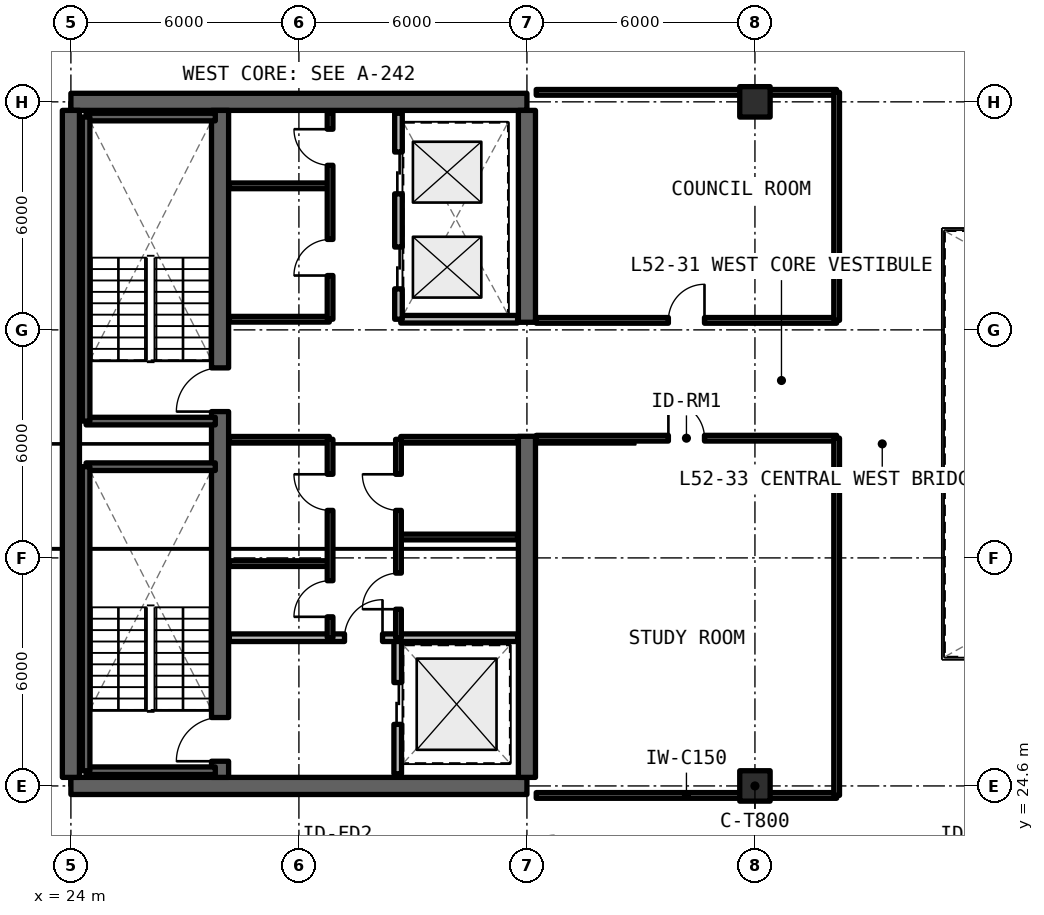
"""IFC4 building model, lengths in metres.
Left out: names, types, materials, properties, quantities, classifications, styles, units other than length and angle.
Written with IfcOpenShell. Run it as: python <this file> out.ifc"""

import sys

from ifc_helpers import new_model, si_unit, direction, frame, frame_2d, origin, origin_2d, place, context, subcontext, project, spatial, rectangle, extrude, element, fill, save


model = new_model("IFC4")
c1 = context("Model", 3, precision=1e-05, world=origin(), true_north=direction((0.0, 1.0)))
c2 = subcontext(c1, "Body", "Model", "MODEL_VIEW")
j1 = project(units=[si_unit("LENGTHUNIT", "METRE"), si_unit("PLANEANGLEUNIT", "RADIAN")], contexts=[c1])
p1 = place(None, origin())
s1 = spatial("IfcSite", under=j1, at=p1, CompositionType="ELEMENT")
p2 = place(p1, origin())
s2 = spatial("IfcBuilding", under=s1, at=p2, CompositionType="ELEMENT")
p3 = place(p2, frame((0.0, 0.0, 188.43)))
s3 = spatial("IfcBuildingStorey", under=s2, at=p3, CompositionType="ELEMENT", Elevation=188.43)
for number, where, z_axis, x_axis in (
    (1, (24.0, 24.6, 0.0), (0.0, 0.0, 1.0), (1.0, 0.0, 0.0)),
    (2, (36.0, 42.6, 0.0), (0.0, 0.0, 1.0), (-1.0, 0.0, 0.0)),
):
    element("IfcWall", number, at=place(p3, frame(where, z_axis=z_axis, x_axis=x_axis)), inside=s3, PredefinedType="SHEAR", context=c2, shape_type="SweptSolid", body=[
        extrude(rectangle(XDim=12.0, YDim=0.45, at=frame_2d((6.0, 0.0))), origin(), (0.0, 0.0, 1.0), 3.3),
    ])
p4 = place(p3, frame((24.0, 24.825, 0.0), z_axis=(0.0, 0.0, 1.0), x_axis=(0.0, 1.0, 0.0)))
e3 = element("IfcWall", 3, at=p4, inside=s3, PredefinedType="SHEAR", context=c2, shape_type="SweptSolid", body=[
    extrude(rectangle(XDim=17.55, YDim=0.45, at=frame_2d((8.775, 0.0))), origin(), (0.0, 0.0, 1.0), 3.3),
])
p5 = place(p3, frame((36.0, 24.825, 0.0), z_axis=(0.0, 0.0, 1.0), x_axis=(0.0, 1.0, 0.0)))
e4 = element("IfcWall", 4, at=p5, inside=s3, PredefinedType="SHEAR", context=c2, shape_type="SweptSolid", body=[
    extrude(rectangle(XDim=8.975, YDim=0.45, at=frame_2d((4.488, 0.0))), origin(), (0.0, 0.0, 1.0), 3.3),
])
p6 = place(p3, frame((36.0, 36.8, 0.0), z_axis=(0.0, 0.0, 1.0), x_axis=(0.0, 1.0, 0.0)))
e5 = element("IfcWall", 5, at=p6, inside=s3, PredefinedType="SHEAR", context=c2, shape_type="SweptSolid", body=[
    extrude(rectangle(XDim=5.575, YDim=0.45, at=frame_2d((2.788, 0.0))), origin(), (0.0, 0.0, 1.0), 3.3),
])
p7 = place(p3, frame((27.925, 24.825, 0.0), z_axis=(0.0, 0.0, 1.0), x_axis=(0.0, 1.0, 0.0)))
e6 = element("IfcWall", 6, at=p7, inside=s3, PredefinedType="SHEAR", context=c2, shape_type="SweptSolid", body=[
    extrude(rectangle(XDim=17.55, YDim=0.45, at=frame_2d((8.775, 0.0))), origin(), (0.0, 0.0, 1.0), 3.3),
])
p8 = place(p7, frame((0.425, 0.0, 0.0)))
e7 = element("IfcOpeningElement", 7, at=p8, cuts=e6, PredefinedType="OPENING", context=c2, shape_type="SweptSolid", body=[
    extrude(rectangle(XDim=1.15, YDim=2.15, at=frame_2d((0.575, 1.075))), frame((0.0, 0.235, 0.0), z_axis=(0.0, -1.0, 0.0), x_axis=(1.0, 0.0, 0.0)), (0.0, 0.0, 1.0), 0.47),
])
p9 = place(p7, frame((9.625, 0.0, 0.0)))
e8 = element("IfcOpeningElement", 8, at=p9, cuts=e6, PredefinedType="OPENING", context=c2, shape_type="SweptSolid", body=[
    extrude(rectangle(XDim=1.15, YDim=2.15, at=frame_2d((0.575, 1.075))), frame((0.0, 0.235, 0.0), z_axis=(0.0, -1.0, 0.0), x_axis=(1.0, 0.0, 0.0)), (0.0, 0.0, 1.0), 0.47),
])
for number, where, z_axis, x_axis in (
    (9, (42.0, 24.6, 0.0), (0.0, 0.0, 1.0), (1.0, 0.0, 0.0)),
    (10, (42.0, 42.6, 0.0), (0.0, 0.0, 1.0), (1.0, 0.0, 0.0)),
):
    element("IfcColumn", number, at=place(p3, frame(where, z_axis=z_axis, x_axis=x_axis)), inside=s3, PredefinedType="COLUMN", context=c2, shape_type="SweptSolid", body=[
        extrude(rectangle(XDim=0.8, YDim=0.8, at=origin_2d()), origin(), (0.0, 0.0, 1.0), 3.3),
    ])
p10 = place(p3, frame((32.6, 24.92, 0.0), z_axis=(0.0, 0.0, 1.0), x_axis=(0.0, 1.0, 0.0)))
e11 = element("IfcWall", 11, at=p10, inside=s3, PredefinedType="SOLIDWALL", context=c2, shape_type="SweptSolid", body=[
    extrude(rectangle(XDim=3.58, YDim=0.2, at=frame_2d((1.79, 0.0))), origin(), (0.0, 0.0, 1.0), 2.35),
])
p11 = place(p10, frame((1.3, 0.0, 0.0)))
e12 = element("IfcOpeningElement", 12, at=p11, cuts=e11, PredefinedType="OPENING", context=c2, shape_type="SweptSolid", body=[
    extrude(rectangle(XDim=1.1, YDim=2.2, at=frame_2d((0.55, 1.1))), frame((0.0, 0.11, 0.0), z_axis=(0.0, -1.0, 0.0), x_axis=(1.0, 0.0, 0.0)), (0.0, 0.0, 1.0), 0.22),
])
p12 = place(p3, frame((28.17, 28.5, 0.0), z_axis=(0.0, 0.0, 1.0), x_axis=(1.0, 0.0, 0.0)))
e13 = element("IfcWall", 13, at=p12, inside=s3, PredefinedType="SOLIDWALL", context=c2, shape_type="SweptSolid", body=[
    extrude(rectangle(XDim=7.585, YDim=0.2, at=frame_2d((3.792, 0.0))), origin(), (0.0, 0.0, 1.0), 2.35),
])
p13 = place(p12, frame((3.03, 0.0, 0.0)))
e14 = element("IfcOpeningElement", 14, at=p13, cuts=e13, PredefinedType="OPENING", context=c2, shape_type="SweptSolid", body=[
    extrude(rectangle(XDim=1.0, YDim=2.15, at=frame_2d((0.5, 1.075))), frame((0.0, 0.11, 0.0), z_axis=(0.0, -1.0, 0.0), x_axis=(1.0, 0.0, 0.0)), (0.0, 0.0, 1.0), 0.22),
])
for number, where, z_axis, x_axis in (
    (15, (28.17, 30.45, 0.0), (0.0, 0.0, 1.0), (1.0, 0.0, 0.0)),
    (16, (28.17, 33.72, 0.0), (0.0, 0.0, 1.0), (1.0, 0.0, 0.0)),
):
    element("IfcWall", number, at=place(p3, frame(where, z_axis=z_axis, x_axis=x_axis)), inside=s3, PredefinedType="SOLIDWALL", context=c2, shape_type="SweptSolid", body=[
        extrude(rectangle(XDim=2.63, YDim=0.15, at=frame_2d((1.315, 0.0))), origin(), (0.0, 0.0, 1.0), 2.35),
    ])
p14 = place(p3, frame((30.82, 28.5, 0.0), z_axis=(0.0, 0.0, 1.0), x_axis=(0.0, 1.0, 0.0)))
e17 = element("IfcWall", 17, at=p14, inside=s3, PredefinedType="SOLIDWALL", context=c2, shape_type="SweptSolid", body=[
    extrude(rectangle(XDim=5.22, YDim=0.15, at=frame_2d((2.61, 0.0))), origin(), (0.0, 0.0, 1.0), 2.35),
])
p15 = place(p14, frame((0.55, 0.0, 0.0)))
e18 = element("IfcOpeningElement", 18, at=p15, cuts=e17, PredefinedType="OPENING", context=c2, shape_type="SweptSolid", body=[
    extrude(rectangle(XDim=0.95, YDim=2.15, at=frame_2d((0.475, 1.075))), frame((0.0, 0.085, 0.0), z_axis=(0.0, -1.0, 0.0), x_axis=(1.0, 0.0, 0.0)), (0.0, 0.0, 1.0), 0.17),
])
p16 = place(p14, frame((3.35, 0.0, 0.0)))
e19 = element("IfcOpeningElement", 19, at=p16, cuts=e17, PredefinedType="OPENING", context=c2, shape_type="SweptSolid", body=[
    extrude(rectangle(XDim=0.95, YDim=2.15, at=frame_2d((0.475, 1.075))), frame((0.0, 0.085, 0.0), z_axis=(0.0, -1.0, 0.0), x_axis=(1.0, 0.0, 0.0)), (0.0, 0.0, 1.0), 0.17),
])
for number, where, z_axis, x_axis in (
    (20, (32.68, 31.15, 0.0), (0.0, 0.0, 1.0), (1.0, 0.0, 0.0)),
    (21, (32.68, 33.72, 0.0), (0.0, 0.0, 1.0), (1.0, 0.0, 0.0)),
):
    element("IfcWall", number, at=place(p3, frame(where, z_axis=z_axis, x_axis=x_axis)), inside=s3, PredefinedType="SOLIDWALL", context=c2, shape_type="SweptSolid", body=[
        extrude(rectangle(XDim=3.075, YDim=0.15, at=frame_2d((1.538, 0.0))), origin(), (0.0, 0.0, 1.0), 2.35),
    ])
p17 = place(p3, frame((32.62, 28.5, 0.0), z_axis=(0.0, 0.0, 1.0), x_axis=(0.0, 1.0, 0.0)))
e22 = element("IfcWall", 22, at=p17, inside=s3, PredefinedType="SOLIDWALL", context=c2, shape_type="SweptSolid", body=[
    extrude(rectangle(XDim=5.22, YDim=0.15, at=frame_2d((2.61, 0.0))), origin(), (0.0, 0.0, 1.0), 2.35),
])
p18 = place(p17, frame((0.75, 0.0, 0.0)))
e23 = element("IfcOpeningElement", 23, at=p18, cuts=e22, PredefinedType="OPENING", context=c2, shape_type="SweptSolid", body=[
    extrude(rectangle(XDim=0.95, YDim=2.15, at=frame_2d((0.475, 1.075))), frame((0.0, 0.085, 0.0), z_axis=(0.0, -1.0, 0.0), x_axis=(1.0, 0.0, 0.0)), (0.0, 0.0, 1.0), 0.17),
])
p19 = place(p17, frame((3.35, 0.0, 0.0)))
e24 = element("IfcOpeningElement", 24, at=p19, cuts=e22, PredefinedType="OPENING", context=c2, shape_type="SweptSolid", body=[
    extrude(rectangle(XDim=0.95, YDim=2.15, at=frame_2d((0.475, 1.075))), frame((0.0, 0.085, 0.0), z_axis=(0.0, -1.0, 0.0), x_axis=(1.0, 0.0, 0.0)), (0.0, 0.0, 1.0), 0.17),
])
for number, where, z_axis, x_axis in (
    (25, (28.17, 36.88, 0.0), (0.0, 0.0, 1.0), (1.0, 0.0, 0.0)),
    (26, (28.17, 40.39, 0.0), (0.0, 0.0, 1.0), (1.0, 0.0, 0.0)),
):
    element("IfcWall", number, at=place(p3, frame(where, z_axis=z_axis, x_axis=x_axis)), inside=s3, PredefinedType="SOLIDWALL", context=c2, shape_type="SweptSolid", body=[
        extrude(rectangle(XDim=2.63, YDim=0.15, at=frame_2d((1.315, 0.0))), origin(), (0.0, 0.0, 1.0), 2.35),
    ])
p20 = place(p3, frame((30.82, 36.88, 0.0), z_axis=(0.0, 0.0, 1.0), x_axis=(0.0, 1.0, 0.0)))
e27 = element("IfcWall", 27, at=p20, inside=s3, PredefinedType="SOLIDWALL", context=c2, shape_type="SweptSolid", body=[
    extrude(rectangle(XDim=5.42, YDim=0.15, at=frame_2d((2.71, 0.0))), origin(), (0.0, 0.0, 1.0), 2.35),
])
p21 = place(p20, frame((1.15, 0.0, 0.0)))
e28 = element("IfcOpeningElement", 28, at=p21, cuts=e27, PredefinedType="OPENING", context=c2, shape_type="SweptSolid", body=[
    extrude(rectangle(XDim=0.95, YDim=2.15, at=frame_2d((0.475, 1.075))), frame((0.0, 0.085, 0.0), z_axis=(0.0, -1.0, 0.0), x_axis=(1.0, 0.0, 0.0)), (0.0, 0.0, 1.0), 0.17),
])
p22 = place(p20, frame((4.05, 0.0, 0.0)))
e29 = element("IfcOpeningElement", 29, at=p22, cuts=e27, PredefinedType="OPENING", context=c2, shape_type="SweptSolid", body=[
    extrude(rectangle(XDim=0.95, YDim=2.15, at=frame_2d((0.475, 1.075))), frame((0.0, 0.085, 0.0), z_axis=(0.0, -1.0, 0.0), x_axis=(1.0, 0.0, 0.0)), (0.0, 0.0, 1.0), 0.17),
])
p23 = place(p3, frame((32.68, 36.88, 0.0), z_axis=(0.0, 0.0, 1.0), x_axis=(1.0, 0.0, 0.0)))
e30 = element("IfcWall", 30, at=p23, inside=s3, PredefinedType="SOLIDWALL", context=c2, shape_type="SweptSolid", body=[
    extrude(rectangle(XDim=3.075, YDim=0.2, at=frame_2d((1.538, 0.0))), origin(), (0.0, 0.0, 1.0), 2.35),
])
p24 = place(p3, frame((32.62, 36.88, 0.0), z_axis=(0.0, 0.0, 1.0), x_axis=(0.0, 1.0, 0.0)))
e31 = element("IfcWall", 31, at=p24, inside=s3, PredefinedType="SOLIDWALL", context=c2, shape_type="SweptSolid", body=[
    extrude(rectangle(XDim=5.42, YDim=0.2, at=frame_2d((2.71, 0.0))), origin(), (0.0, 0.0, 1.0), 2.35),
])
p25 = place(p24, frame((0.8, 0.0, 0.0)))
e32 = element("IfcOpeningElement", 32, at=p25, cuts=e31, PredefinedType="OPENING", context=c2, shape_type="SweptSolid", body=[
    extrude(rectangle(XDim=1.1, YDim=2.2, at=frame_2d((0.55, 1.1))), frame((0.0, 0.11, 0.0), z_axis=(0.0, -1.0, 0.0), x_axis=(1.0, 0.0, 0.0)), (0.0, 0.0, 1.0), 0.22),
])
p26 = place(p24, frame((3.3, 0.0, 0.0)))
e33 = element("IfcOpeningElement", 33, at=p26, cuts=e31, PredefinedType="OPENING", context=c2, shape_type="SweptSolid", body=[
    extrude(rectangle(XDim=1.1, YDim=2.2, at=frame_2d((0.55, 1.1))), frame((0.0, 0.11, 0.0), z_axis=(0.0, -1.0, 0.0), x_axis=(1.0, 0.0, 0.0)), (0.0, 0.0, 1.0), 0.22),
])
p27 = place(p3, frame((36.245, 24.35, 0.0), z_axis=(0.0, 0.0, 1.0), x_axis=(1.0, 0.0, 0.0)))
e34 = element("IfcWall", 34, at=p27, inside=s3, PredefinedType="SOLIDWALL", context=c2, shape_type="SweptSolid", body=[
    extrude(rectangle(XDim=7.905, YDim=0.15, at=frame_2d((3.952, 0.0))), origin(), (0.0, 0.0, 1.0), 2.35),
])
p28 = place(p3, frame((36.245, 33.75, 0.0), z_axis=(0.0, 0.0, 1.0), x_axis=(1.0, 0.0, 0.0)))
e35 = element("IfcWall", 35, at=p28, inside=s3, PredefinedType="SOLIDWALL", context=c2, shape_type="SweptSolid", body=[
    extrude(rectangle(XDim=7.905, YDim=0.15, at=frame_2d((3.952, 0.0))), origin(), (0.0, 0.0, 1.0), 2.35),
])
p29 = place(p28, frame((3.478, 0.0, 0.0)))
e36 = element("IfcOpeningElement", 36, at=p29, cuts=e35, PredefinedType="OPENING", context=c2, shape_type="SweptSolid", body=[
    extrude(rectangle(XDim=0.95, YDim=2.15, at=frame_2d((0.475, 1.075))), frame((0.0, 0.085, 0.0), z_axis=(0.0, -1.0, 0.0), x_axis=(1.0, 0.0, 0.0)), (0.0, 0.0, 1.0), 0.17),
])
p30 = place(p3, frame((44.15, 24.35, 0.0), z_axis=(0.0, 0.0, 1.0), x_axis=(0.0, 1.0, 0.0)))
e37 = element("IfcWall", 37, at=p30, inside=s3, PredefinedType="SOLIDWALL", context=c2, shape_type="SweptSolid", body=[
    extrude(rectangle(XDim=9.4, YDim=0.15, at=frame_2d((4.7, 0.0))), origin(), (0.0, 0.0, 1.0), 2.35),
])
p31 = place(p3, frame((36.245, 36.85, 0.0), z_axis=(0.0, 0.0, 1.0), x_axis=(1.0, 0.0, 0.0)))
e38 = element("IfcWall", 38, at=p31, inside=s3, PredefinedType="SOLIDWALL", context=c2, shape_type="SweptSolid", body=[
    extrude(rectangle(XDim=7.905, YDim=0.15, at=frame_2d((3.952, 0.0))), origin(), (0.0, 0.0, 1.0), 2.35),
])
p32 = place(p31, frame((3.478, 0.0, 0.0)))
e39 = element("IfcOpeningElement", 39, at=p32, cuts=e38, PredefinedType="OPENING", context=c2, shape_type="SweptSolid", body=[
    extrude(rectangle(XDim=0.95, YDim=2.15, at=frame_2d((0.475, 1.075))), frame((0.0, 0.085, 0.0), z_axis=(0.0, -1.0, 0.0), x_axis=(1.0, 0.0, 0.0)), (0.0, 0.0, 1.0), 0.17),
])
p33 = place(p3, frame((36.245, 42.85, 0.0), z_axis=(0.0, 0.0, 1.0), x_axis=(1.0, 0.0, 0.0)))
e40 = element("IfcWall", 40, at=p33, inside=s3, PredefinedType="SOLIDWALL", context=c2, shape_type="SweptSolid", body=[
    extrude(rectangle(XDim=7.905, YDim=0.15, at=frame_2d((3.952, 0.0))), origin(), (0.0, 0.0, 1.0), 2.35),
])
p34 = place(p3, frame((44.15, 36.85, 0.0), z_axis=(0.0, 0.0, 1.0), x_axis=(0.0, 1.0, 0.0)))
e41 = element("IfcWall", 41, at=p34, inside=s3, PredefinedType="SOLIDWALL", context=c2, shape_type="SweptSolid", body=[
    extrude(rectangle(XDim=6.0, YDim=0.15, at=frame_2d((3.0, 0.0))), origin(), (0.0, 0.0, 1.0), 2.35),
])
for number, where, z_axis, x_axis in (
    (42, (24.4, 25.0, 0.0), (0.0, 0.0, 1.0), (1.0, 0.0, 0.0)),
    (43, (27.8, 33.0, 0.0), (0.0, 0.0, 1.0), (-1.0, 0.0, 0.0)),
):
    element("IfcWall", number, at=place(p3, frame(where, z_axis=z_axis, x_axis=x_axis)), inside=s3, PredefinedType="SOLIDWALL", context=c2, shape_type="SweptSolid", body=[
        extrude(rectangle(XDim=3.4, YDim=0.2, at=frame_2d((1.7, 0.0))), origin(), (0.0, 0.0, 1.0), 3.3),
    ])
p35 = place(p3, frame((24.4, 33.0, 0.0), z_axis=(0.0, 0.0, 1.0), x_axis=(0.0, -1.0, 0.0)))
e44 = element("IfcWall", 44, at=p35, inside=s3, PredefinedType="SOLIDWALL", context=c2, shape_type="SweptSolid", body=[
    extrude(rectangle(XDim=8.0, YDim=0.2, at=frame_2d((4.0, 0.0))), origin(), (0.0, 0.0, 1.0), 3.3),
])
for number, where, z_axis, x_axis in (
    (45, (24.4, 34.2, 0.0), (0.0, 0.0, 1.0), (1.0, 0.0, 0.0)),
    (46, (27.8, 42.2, 0.0), (0.0, 0.0, 1.0), (-1.0, 0.0, 0.0)),
):
    element("IfcWall", number, at=place(p3, frame(where, z_axis=z_axis, x_axis=x_axis)), inside=s3, PredefinedType="SOLIDWALL", context=c2, shape_type="SweptSolid", body=[
        extrude(rectangle(XDim=3.4, YDim=0.2, at=frame_2d((1.7, 0.0))), origin(), (0.0, 0.0, 1.0), 3.3),
    ])
p36 = place(p3, frame((24.4, 42.2, 0.0), z_axis=(0.0, 0.0, 1.0), x_axis=(0.0, -1.0, 0.0)))
e47 = element("IfcWall", 47, at=p36, inside=s3, PredefinedType="SOLIDWALL", context=c2, shape_type="SweptSolid", body=[
    extrude(rectangle(XDim=8.0, YDim=0.2, at=frame_2d((4.0, 0.0))), origin(), (0.0, 0.0, 1.0), 3.3),
])
p37 = place(p11, origin())
e48 = element("IfcDoor", 48, at=p37, inside=s3, OperationType="SLIDING_TO_LEFT", PredefinedType="DOOR", context=c2, shape_type="SweptSolid", body=[
    extrude(rectangle(XDim=1.1, YDim=2.2, at=frame_2d((0.55, 1.1))), frame((0.0, 0.025, 0.0), z_axis=(0.0, -1.0, 0.0), x_axis=(1.0, 0.0, 0.0)), (0.0, 0.0, 1.0), 0.05),
])
fill(e12, e48)
p38 = place(p13, origin())
e49 = element("IfcDoor", 49, at=p38, inside=s3, OperationType="SINGLE_SWING_RIGHT", PredefinedType="DOOR", context=c2, shape_type="SweptSolid", body=[
    extrude(rectangle(XDim=1.0, YDim=2.15, at=frame_2d((0.5, 1.075))), frame((0.0, 0.025, 0.0), z_axis=(0.0, -1.0, 0.0), x_axis=(1.0, 0.0, 0.0)), (0.0, 0.0, 1.0), 0.05),
])
fill(e14, e49)
p39 = place(p15, origin())
e50 = element("IfcDoor", 50, at=p39, inside=s3, OperationType="SINGLE_SWING_LEFT", PredefinedType="DOOR", context=c2, shape_type="SweptSolid", body=[
    extrude(rectangle(XDim=0.95, YDim=2.15, at=frame_2d((0.475, 1.075))), frame((0.0, 0.025, 0.0), z_axis=(0.0, -1.0, 0.0), x_axis=(1.0, 0.0, 0.0)), (0.0, 0.0, 1.0), 0.05),
])
fill(e18, e50)
p40 = place(p16, origin())
e51 = element("IfcDoor", 51, at=p40, inside=s3, OperationType="SINGLE_SWING_RIGHT", PredefinedType="DOOR", context=c2, shape_type="SweptSolid", body=[
    extrude(rectangle(XDim=0.95, YDim=2.15, at=frame_2d((0.475, 1.075))), frame((0.0, 0.025, 0.0), z_axis=(0.0, -1.0, 0.0), x_axis=(1.0, 0.0, 0.0)), (0.0, 0.0, 1.0), 0.05),
])
fill(e19, e51)
p41 = place(p18, origin())
e52 = element("IfcDoor", 52, at=p41, inside=s3, OperationType="SINGLE_SWING_LEFT", PredefinedType="DOOR", context=c2, shape_type="SweptSolid", body=[
    extrude(rectangle(XDim=0.95, YDim=2.15, at=frame_2d((0.475, 1.075))), frame((0.0, 0.025, 0.0), z_axis=(0.0, -1.0, 0.0), x_axis=(1.0, 0.0, 0.0)), (0.0, 0.0, 1.0), 0.05),
])
fill(e23, e52)
p42 = place(p19, origin())
e53 = element("IfcDoor", 53, at=p42, inside=s3, OperationType="SINGLE_SWING_RIGHT", PredefinedType="DOOR", context=c2, shape_type="SweptSolid", body=[
    extrude(rectangle(XDim=0.95, YDim=2.15, at=frame_2d((0.475, 1.075))), frame((0.0, 0.025, 0.0), z_axis=(0.0, -1.0, 0.0), x_axis=(1.0, 0.0, 0.0)), (0.0, 0.0, 1.0), 0.05),
])
fill(e24, e53)
p43 = place(p21, origin())
e54 = element("IfcDoor", 54, at=p43, inside=s3, OperationType="SINGLE_SWING_LEFT", PredefinedType="DOOR", context=c2, shape_type="SweptSolid", body=[
    extrude(rectangle(XDim=0.95, YDim=2.15, at=frame_2d((0.475, 1.075))), frame((0.0, 0.025, 0.0), z_axis=(0.0, -1.0, 0.0), x_axis=(1.0, 0.0, 0.0)), (0.0, 0.0, 1.0), 0.05),
])
fill(e28, e54)
p44 = place(p22, origin())
e55 = element("IfcDoor", 55, at=p44, inside=s3, OperationType="SINGLE_SWING_RIGHT", PredefinedType="DOOR", context=c2, shape_type="SweptSolid", body=[
    extrude(rectangle(XDim=0.95, YDim=2.15, at=frame_2d((0.475, 1.075))), frame((0.0, 0.025, 0.0), z_axis=(0.0, -1.0, 0.0), x_axis=(1.0, 0.0, 0.0)), (0.0, 0.0, 1.0), 0.05),
])
fill(e29, e55)
p45 = place(p25, origin())
e56 = element("IfcDoor", 56, at=p45, inside=s3, OperationType="SLIDING_TO_LEFT", PredefinedType="DOOR", context=c2, shape_type="SweptSolid", body=[
    extrude(rectangle(XDim=1.1, YDim=2.2, at=frame_2d((0.55, 1.1))), frame((0.0, 0.025, 0.0), z_axis=(0.0, -1.0, 0.0), x_axis=(1.0, 0.0, 0.0)), (0.0, 0.0, 1.0), 0.05),
])
fill(e32, e56)
p46 = place(p26, origin())
e57 = element("IfcDoor", 57, at=p46, inside=s3, OperationType="SLIDING_TO_RIGHT", PredefinedType="DOOR", context=c2, shape_type="SweptSolid", body=[
    extrude(rectangle(XDim=1.1, YDim=2.2, at=frame_2d((0.55, 1.1))), frame((0.0, 0.025, 0.0), z_axis=(0.0, -1.0, 0.0), x_axis=(1.0, 0.0, 0.0)), (0.0, 0.0, 1.0), 0.05),
])
fill(e33, e57)
p47 = place(p29, origin())
e58 = element("IfcDoor", 58, at=p47, inside=s3, OperationType="SINGLE_SWING_LEFT", PredefinedType="DOOR", context=c2, shape_type="SweptSolid", body=[
    extrude(rectangle(XDim=0.95, YDim=2.15, at=frame_2d((0.475, 1.075))), frame((0.0, 0.025, 0.0), z_axis=(0.0, -1.0, 0.0), x_axis=(1.0, 0.0, 0.0)), (0.0, 0.0, 1.0), 0.05),
])
fill(e36, e58)
p48 = place(p32, origin())
e59 = element("IfcDoor", 59, at=p48, inside=s3, OperationType="SINGLE_SWING_RIGHT", PredefinedType="DOOR", context=c2, shape_type="SweptSolid", body=[
    extrude(rectangle(XDim=0.95, YDim=2.15, at=frame_2d((0.475, 1.075))), frame((0.0, 0.025, 0.0), z_axis=(0.0, -1.0, 0.0), x_axis=(1.0, 0.0, 0.0)), (0.0, 0.0, 1.0), 0.05),
])
fill(e39, e59)
p49 = place(p8, origin())
e60 = element("IfcDoor", 60, at=p49, inside=s3, OperationType="SINGLE_SWING_RIGHT", PredefinedType="DOOR", context=c2, shape_type="SweptSolid", body=[
    extrude(rectangle(XDim=1.15, YDim=2.15, at=frame_2d((0.575, 1.075))), frame((0.0, 0.025, 0.0), z_axis=(0.0, -1.0, 0.0), x_axis=(1.0, 0.0, 0.0)), (0.0, 0.0, 1.0), 0.05),
])
fill(e7, e60)
p50 = place(p9, origin())
e61 = element("IfcDoor", 61, at=p50, inside=s3, OperationType="SINGLE_SWING_LEFT", PredefinedType="DOOR", context=c2, shape_type="SweptSolid", body=[
    extrude(rectangle(XDim=1.15, YDim=2.15, at=frame_2d((0.575, 1.075))), frame((0.0, 0.025, 0.0), z_axis=(0.0, -1.0, 0.0), x_axis=(1.0, 0.0, 0.0)), (0.0, 0.0, 1.0), 0.05),
])
fill(e8, e61)
save(model, sys.argv[1])
